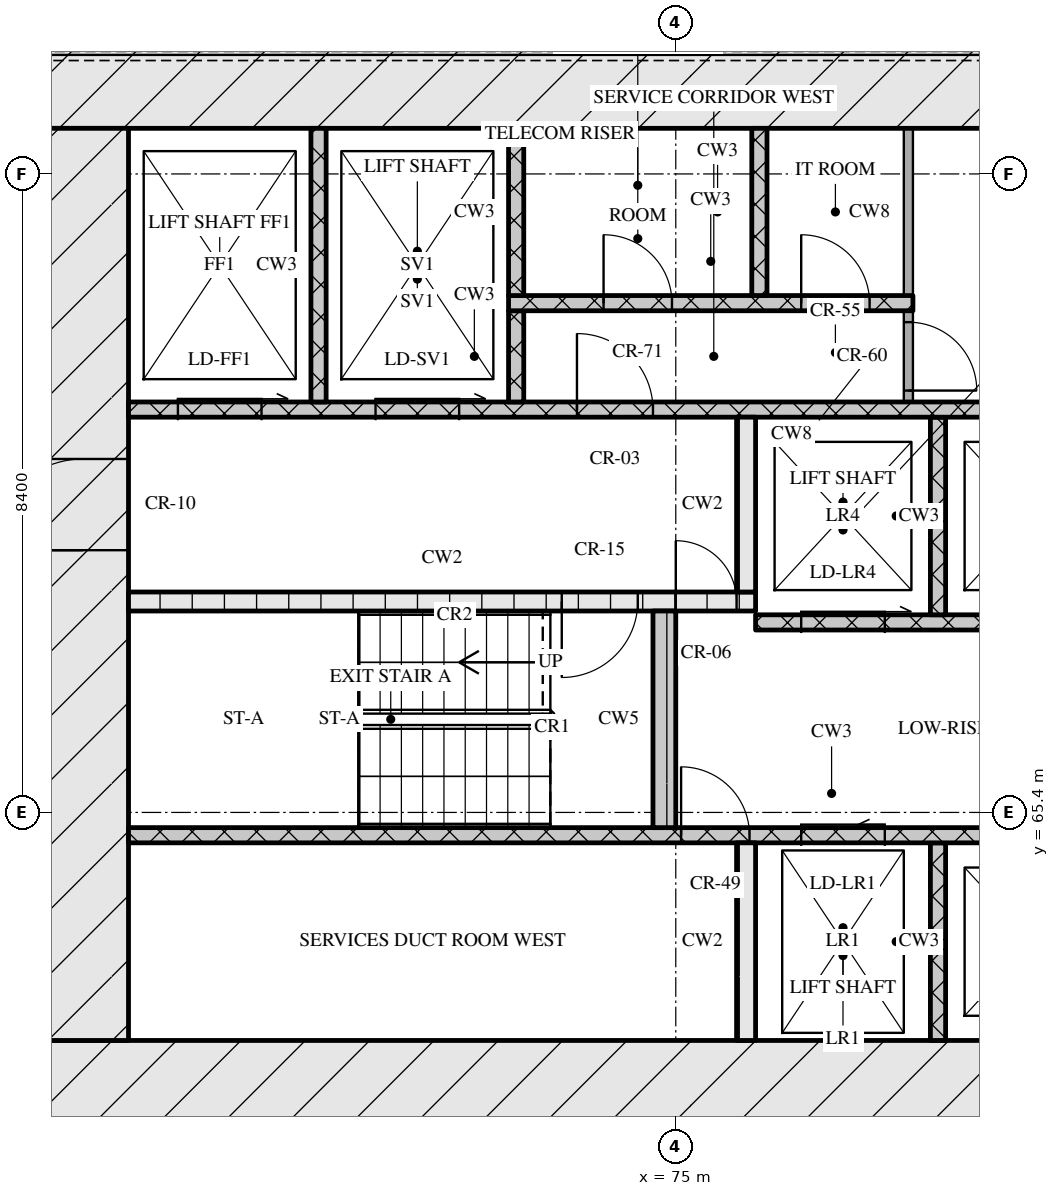
"""IFC4 building model, lengths in metres.
Left out: names, types, materials, properties, quantities, classifications, styles, units other than length and angle.
Written with IfcOpenShell. Run it as: python <this file> out.ifc"""

import sys

from ifc_helpers import new_model, si_unit, direction, frame, frame_2d, origin, place, context, subcontext, project, spatial, rectangle, extrude, element, fill, save


model = new_model("IFC4")
c1 = context("Model", 3, precision=1e-05, world=origin(), true_north=direction((0.0, 1.0)))
c2 = subcontext(c1, "Body", "Model", "MODEL_VIEW")
j1 = project(units=[si_unit("LENGTHUNIT", "METRE"), si_unit("PLANEANGLEUNIT", "RADIAN")], contexts=[c1])
p1 = place(None, origin())
s1 = spatial("IfcSite", under=j1, at=p1, CompositionType="ELEMENT")
p2 = place(p1, origin())
s2 = spatial("IfcBuilding", under=s1, at=p2, CompositionType="ELEMENT")
p3 = place(p2, frame((0.0, 0.0, 76.8)))
s3 = spatial("IfcBuildingStorey", under=s2, at=p3, CompositionType="ELEMENT", Elevation=76.8)
p4 = place(p3, frame((66.6, 61.8, 0.0), z_axis=(0.0, 0.0, 1.0), x_axis=(1.0, 0.0, 0.0)))
e1 = element("IfcWall", 1, at=p4, inside=s3, PredefinedType="SOLIDWALL", context=c2, shape_type="SweptSolid", body=[
    extrude(rectangle(XDim=42.0, YDim=1.2, at=frame_2d((21.0, 0.0))), origin(), (0.0, 0.0, 1.0), 3.32),
])
p5 = place(p4, frame((21.35, 0.0, 0.0)))
e2 = element("IfcOpeningElement", 2, at=p5, cuts=e1, PredefinedType="OPENING", context=c2, shape_type="SweptSolid", body=[
    extrude(rectangle(XDim=1.8, YDim=2.1, at=frame_2d((0.9, 1.05))), frame((0.0, 0.61, 0.0), z_axis=(0.0, -1.0, 0.0), x_axis=(1.0, 0.0, 0.0)), (0.0, 0.0, 1.0), 1.22),
])
p6 = place(p3, frame((66.6, 75.0, 0.0), z_axis=(0.0, 0.0, 1.0), x_axis=(1.0, 0.0, 0.0)))
e3 = element("IfcWall", 3, at=p6, inside=s3, PredefinedType="SOLIDWALL", context=c2, shape_type="SweptSolid", body=[
    extrude(rectangle(XDim=42.0, YDim=1.2, at=frame_2d((21.0, 0.0))), origin(), (0.0, 0.0, 1.0), 3.32),
])
p7 = place(p3, frame((67.2, 62.4, 0.0), z_axis=(0.0, 0.0, 1.0), x_axis=(0.0, 1.0, 0.0)))
e4 = element("IfcWall", 4, at=p7, inside=s3, PredefinedType="SOLIDWALL", context=c2, shape_type="SweptSolid", body=[
    extrude(rectangle(XDim=12.0, YDim=1.2, at=frame_2d((6.0, 0.0))), origin(), (0.0, 0.0, 1.0), 3.32),
])
p8 = place(p7, frame((6.45, 0.0, 0.0)))
e5 = element("IfcOpeningElement", 5, at=p8, cuts=e4, PredefinedType="OPENING", context=c2, shape_type="SweptSolid", body=[
    extrude(rectangle(XDim=1.2, YDim=2.1, at=frame_2d((0.6, 1.05))), frame((0.0, 0.61, 0.0), z_axis=(0.0, -1.0, 0.0), x_axis=(1.0, 0.0, 0.0)), (0.0, 0.0, 1.0), 1.22),
])
p9 = place(p3, frame((75.925, 62.4, 0.0), z_axis=(0.0, 0.0, 1.0), x_axis=(0.0, 1.0, 0.0)))
e6 = element("IfcWall", 6, at=p9, inside=s3, PredefinedType="SOLIDWALL", context=c2, shape_type="SweptSolid", body=[
    extrude(rectangle(XDim=2.6, YDim=0.25, at=frame_2d((1.3, 0.0))), origin(), (0.0, 0.0, 1.0), 3.32),
])
p10 = place(p3, frame((78.45, 62.4, 0.0), z_axis=(0.0, 0.0, 1.0), x_axis=(0.0, 1.0, 0.0)))
e7 = element("IfcWall", 7, at=p10, inside=s3, PredefinedType="SOLIDWALL", context=c2, shape_type="SweptSolid", body=[
    extrude(rectangle(XDim=2.6, YDim=0.2, at=frame_2d((1.3, 0.0))), origin(), (0.0, 0.0, 1.0), 3.32),
])
p11 = place(p3, frame((67.8, 65.1, 0.0), z_axis=(0.0, 0.0, 1.0), x_axis=(1.0, 0.0, 0.0)))
e8 = element("IfcWall", 8, at=p11, inside=s3, PredefinedType="SOLIDWALL", context=c2, shape_type="SweptSolid", body=[
    extrude(rectangle(XDim=18.5, YDim=0.2, at=frame_2d((9.25, 0.0))), origin(), (0.0, 0.0, 1.0), 3.32),
])
p12 = place(p11, frame((7.27, 0.0, 0.0)))
e9 = element("IfcOpeningElement", 9, at=p12, cuts=e8, PredefinedType="OPENING", context=c2, shape_type="SweptSolid", body=[
    extrude(rectangle(XDim=0.9, YDim=2.1, at=frame_2d((0.45, 1.05))), frame((0.0, 0.11, 0.0), z_axis=(0.0, -1.0, 0.0), x_axis=(1.0, 0.0, 0.0)), (0.0, 0.0, 1.0), 0.22),
])
p13 = place(p11, frame((8.85, 0.0, 0.0)))
e10 = element("IfcOpeningElement", 10, at=p13, cuts=e8, PredefinedType="OPENING", context=c2, shape_type="SweptSolid", body=[
    extrude(rectangle(XDim=1.1, YDim=2.1, at=frame_2d((0.55, 1.05))), frame((0.0, 0.11, 0.0), z_axis=(0.0, -1.0, 0.0), x_axis=(1.0, 0.0, 0.0)), (0.0, 0.0, 1.0), 0.22),
])
p14 = place(p11, frame((11.35, 0.0, 0.0)))
e11 = element("IfcOpeningElement", 11, at=p14, cuts=e8, PredefinedType="OPENING", context=c2, shape_type="SweptSolid", body=[
    extrude(rectangle(XDim=1.1, YDim=2.1, at=frame_2d((0.55, 1.05))), frame((0.0, 0.11, 0.0), z_axis=(0.0, -1.0, 0.0), x_axis=(1.0, 0.0, 0.0)), (0.0, 0.0, 1.0), 0.22),
])
p15 = place(p11, frame((13.85, 0.0, 0.0)))
e12 = element("IfcOpeningElement", 12, at=p15, cuts=e8, PredefinedType="OPENING", context=c2, shape_type="SweptSolid", body=[
    extrude(rectangle(XDim=1.1, YDim=2.1, at=frame_2d((0.55, 1.05))), frame((0.0, 0.11, 0.0), z_axis=(0.0, -1.0, 0.0), x_axis=(1.0, 0.0, 0.0)), (0.0, 0.0, 1.0), 0.22),
])
p16 = place(p11, frame((16.7, 0.0, 0.0)))
e13 = element("IfcOpeningElement", 13, at=p16, cuts=e8, PredefinedType="OPENING", context=c2, shape_type="SweptSolid", body=[
    extrude(rectangle(XDim=0.9, YDim=2.1, at=frame_2d((0.45, 1.05))), frame((0.0, 0.11, 0.0), z_axis=(0.0, -1.0, 0.0), x_axis=(1.0, 0.0, 0.0)), (0.0, 0.0, 1.0), 0.22),
])
p17 = place(p3, frame((74.85, 65.2, 0.0), z_axis=(0.0, 0.0, 1.0), x_axis=(0.0, 1.0, 0.0)))
e14 = element("IfcWall", 14, at=p17, inside=s3, PredefinedType="SOLIDWALL", context=c2, shape_type="SweptSolid", body=[
    extrude(rectangle(XDim=2.85, YDim=0.3, at=frame_2d((1.425, 0.0))), origin(), (0.0, 0.0, 1.0), 3.32),
])
p18 = place(p3, frame((76.05, 67.9, 0.0), z_axis=(0.0, 0.0, 1.0), x_axis=(1.0, 0.0, 0.0)))
e15 = element("IfcWall", 15, at=p18, inside=s3, PredefinedType="SOLIDWALL", context=c2, shape_type="SweptSolid", body=[
    extrude(rectangle(XDim=23.1, YDim=0.2, at=frame_2d((11.55, 0.0))), origin(), (0.0, 0.0, 1.0), 3.32),
])
p19 = place(p18, frame((0.6, 0.0, 0.0)))
e16 = element("IfcOpeningElement", 16, at=p19, cuts=e15, PredefinedType="OPENING", context=c2, shape_type="SweptSolid", body=[
    extrude(rectangle(XDim=1.1, YDim=2.1, at=frame_2d((0.55, 1.05))), frame((0.0, 0.11, 0.0), z_axis=(0.0, -1.0, 0.0), x_axis=(1.0, 0.0, 0.0)), (0.0, 0.0, 1.0), 0.22),
])
p20 = place(p18, frame((3.1, 0.0, 0.0)))
e17 = element("IfcOpeningElement", 17, at=p20, cuts=e15, PredefinedType="OPENING", context=c2, shape_type="SweptSolid", body=[
    extrude(rectangle(XDim=1.1, YDim=2.1, at=frame_2d((0.55, 1.05))), frame((0.0, 0.11, 0.0), z_axis=(0.0, -1.0, 0.0), x_axis=(1.0, 0.0, 0.0)), (0.0, 0.0, 1.0), 0.22),
])
p21 = place(p18, frame((5.6, 0.0, 0.0)))
e18 = element("IfcOpeningElement", 18, at=p21, cuts=e15, PredefinedType="OPENING", context=c2, shape_type="SweptSolid", body=[
    extrude(rectangle(XDim=1.1, YDim=2.1, at=frame_2d((0.55, 1.05))), frame((0.0, 0.11, 0.0), z_axis=(0.0, -1.0, 0.0), x_axis=(1.0, 0.0, 0.0)), (0.0, 0.0, 1.0), 0.22),
])
p22 = place(p18, frame((8.45, 0.0, 0.0)))
e19 = element("IfcOpeningElement", 19, at=p22, cuts=e15, PredefinedType="OPENING", context=c2, shape_type="SweptSolid", body=[
    extrude(rectangle(XDim=0.9, YDim=2.1, at=frame_2d((0.45, 1.05))), frame((0.0, 0.11, 0.0), z_axis=(0.0, -1.0, 0.0), x_axis=(1.0, 0.0, 0.0)), (0.0, 0.0, 1.0), 0.22),
])
p23 = place(p18, frame((10.91, 0.0, 0.0)))
e20 = element("IfcOpeningElement", 20, at=p23, cuts=e15, PredefinedType="OPENING", context=c2, shape_type="SweptSolid", body=[
    extrude(rectangle(XDim=0.9, YDim=2.1, at=frame_2d((0.45, 1.05))), frame((0.0, 0.11, 0.0), z_axis=(0.0, -1.0, 0.0), x_axis=(1.0, 0.0, 0.0)), (0.0, 0.0, 1.0), 0.22),
])
p24 = place(p18, frame((13.55, 0.0, 0.0)))
e21 = element("IfcOpeningElement", 21, at=p24, cuts=e15, PredefinedType="OPENING", context=c2, shape_type="SweptSolid", body=[
    extrude(rectangle(XDim=1.0, YDim=2.1, at=frame_2d((0.5, 1.05))), frame((0.0, 0.11, 0.0), z_axis=(0.0, -1.0, 0.0), x_axis=(1.0, 0.0, 0.0)), (0.0, 0.0, 1.0), 0.22),
])
p25 = place(p3, frame((78.45, 68.0, 0.0), z_axis=(0.0, 0.0, 1.0), x_axis=(0.0, 1.0, 0.0)))
e22 = element("IfcWall", 22, at=p25, inside=s3, PredefinedType="SOLIDWALL", context=c2, shape_type="SweptSolid", body=[
    extrude(rectangle(XDim=2.6, YDim=0.2, at=frame_2d((1.3, 0.0))), origin(), (0.0, 0.0, 1.0), 3.32),
])
p26 = place(p3, frame((67.8, 68.175, 0.0), z_axis=(0.0, 0.0, 1.0), x_axis=(1.0, 0.0, 0.0)))
e23 = element("IfcWall", 23, at=p26, inside=s3, PredefinedType="SOLIDWALL", context=c2, shape_type="SweptSolid", body=[
    extrude(rectangle(XDim=8.25, YDim=0.25, at=frame_2d((4.125, 0.0))), origin(), (0.0, 0.0, 1.0), 3.32),
])
p27 = place(p26, frame((5.7, 0.0, 0.0)))
e24 = element("IfcOpeningElement", 24, at=p27, cuts=e23, PredefinedType="OPENING", context=c2, shape_type="SweptSolid", body=[
    extrude(rectangle(XDim=1.0, YDim=2.1, at=frame_2d((0.5, 1.05))), frame((0.0, 0.135, 0.0), z_axis=(0.0, -1.0, 0.0), x_axis=(1.0, 0.0, 0.0)), (0.0, 0.0, 1.0), 0.27),
])
p28 = place(p26, frame((7.2, 0.0, 0.0)))
e25 = element("IfcOpeningElement", 25, at=p28, cuts=e23, PredefinedType="OPENING", context=c2, shape_type="SweptSolid", body=[
    extrude(rectangle(XDim=0.8, YDim=2.1, at=frame_2d((0.4, 1.05))), frame((0.0, 0.135, 0.0), z_axis=(0.0, -1.0, 0.0), x_axis=(1.0, 0.0, 0.0)), (0.0, 0.0, 1.0), 0.27),
])
p29 = place(p3, frame((75.925, 68.3, 0.0), z_axis=(0.0, 0.0, 1.0), x_axis=(0.0, 1.0, 0.0)))
e26 = element("IfcWall", 26, at=p29, inside=s3, PredefinedType="SOLIDWALL", context=c2, shape_type="SweptSolid", body=[
    extrude(rectangle(XDim=2.3, YDim=0.25, at=frame_2d((1.15, 0.0))), origin(), (0.0, 0.0, 1.0), 3.32),
])
p30 = place(p3, frame((67.8, 70.7, 0.0), z_axis=(0.0, 0.0, 1.0), x_axis=(1.0, 0.0, 0.0)))
e27 = element("IfcWall", 27, at=p30, inside=s3, PredefinedType="SOLIDWALL", context=c2, shape_type="SweptSolid", body=[
    extrude(rectangle(XDim=39.6, YDim=0.2, at=frame_2d((19.8, 0.0))), origin(), (0.0, 0.0, 1.0), 3.32),
])
p31 = place(p30, frame((0.65, 0.0, 0.0)))
e28 = element("IfcOpeningElement", 28, at=p31, cuts=e27, PredefinedType="OPENING", context=c2, shape_type="SweptSolid", body=[
    extrude(rectangle(XDim=1.1, YDim=2.1, at=frame_2d((0.55, 1.05))), frame((0.0, 0.11, 0.0), z_axis=(0.0, -1.0, 0.0), x_axis=(1.0, 0.0, 0.0)), (0.0, 0.0, 1.0), 0.22),
])
p32 = place(p30, frame((3.25, 0.0, 0.0)))
e29 = element("IfcOpeningElement", 29, at=p32, cuts=e27, PredefinedType="OPENING", context=c2, shape_type="SweptSolid", body=[
    extrude(rectangle(XDim=1.1, YDim=2.1, at=frame_2d((0.55, 1.05))), frame((0.0, 0.11, 0.0), z_axis=(0.0, -1.0, 0.0), x_axis=(1.0, 0.0, 0.0)), (0.0, 0.0, 1.0), 0.22),
])
p33 = place(p30, frame((5.9, 0.0, 0.0)))
e30 = element("IfcOpeningElement", 30, at=p33, cuts=e27, PredefinedType="OPENING", context=c2, shape_type="SweptSolid", body=[
    extrude(rectangle(XDim=1.0, YDim=2.1, at=frame_2d((0.5, 1.05))), frame((0.0, 0.11, 0.0), z_axis=(0.0, -1.0, 0.0), x_axis=(1.0, 0.0, 0.0)), (0.0, 0.0, 1.0), 0.22),
])
p34 = place(p30, frame((21.7, 0.0, 0.0)))
e31 = element("IfcOpeningElement", 31, at=p34, cuts=e27, PredefinedType="OPENING", context=c2, shape_type="SweptSolid", body=[
    extrude(rectangle(XDim=1.0, YDim=2.1, at=frame_2d((0.5, 1.05))), frame((0.0, 0.11, 0.0), z_axis=(0.0, -1.0, 0.0), x_axis=(1.0, 0.0, 0.0)), (0.0, 0.0, 1.0), 0.22),
])
p35 = place(p30, frame((32.7, 0.0, 0.0)))
e32 = element("IfcOpeningElement", 32, at=p35, cuts=e27, PredefinedType="OPENING", context=c2, shape_type="SweptSolid", body=[
    extrude(rectangle(XDim=1.0, YDim=2.1, at=frame_2d((0.5, 1.05))), frame((0.0, 0.11, 0.0), z_axis=(0.0, -1.0, 0.0), x_axis=(1.0, 0.0, 0.0)), (0.0, 0.0, 1.0), 0.22),
])
p36 = place(p30, frame((35.25, 0.0, 0.0)))
e33 = element("IfcOpeningElement", 33, at=p36, cuts=e27, PredefinedType="OPENING", context=c2, shape_type="SweptSolid", body=[
    extrude(rectangle(XDim=1.1, YDim=2.1, at=frame_2d((0.55, 1.05))), frame((0.0, 0.11, 0.0), z_axis=(0.0, -1.0, 0.0), x_axis=(1.0, 0.0, 0.0)), (0.0, 0.0, 1.0), 0.22),
])
p37 = place(p30, frame((37.85, 0.0, 0.0)))
e34 = element("IfcOpeningElement", 34, at=p37, cuts=e27, PredefinedType="OPENING", context=c2, shape_type="SweptSolid", body=[
    extrude(rectangle(XDim=1.1, YDim=2.1, at=frame_2d((0.55, 1.05))), frame((0.0, 0.11, 0.0), z_axis=(0.0, -1.0, 0.0), x_axis=(1.0, 0.0, 0.0)), (0.0, 0.0, 1.0), 0.22),
])
p38 = place(p3, frame((70.3, 70.8, 0.0), z_axis=(0.0, 0.0, 1.0), x_axis=(0.0, 1.0, 0.0)))
e35 = element("IfcWall", 35, at=p38, inside=s3, PredefinedType="SOLIDWALL", context=c2, shape_type="SweptSolid", body=[
    extrude(rectangle(XDim=3.6, YDim=0.2, at=frame_2d((1.8, 0.0))), origin(), (0.0, 0.0, 1.0), 3.32),
])
p39 = place(p3, frame((72.9, 70.8, 0.0), z_axis=(0.0, 0.0, 1.0), x_axis=(0.0, 1.0, 0.0)))
e36 = element("IfcWall", 36, at=p39, inside=s3, PredefinedType="SOLIDWALL", context=c2, shape_type="SweptSolid", body=[
    extrude(rectangle(XDim=1.2, YDim=0.2, at=frame_2d((0.6, 0.0))), origin(), (0.0, 0.0, 1.0), 3.32),
])
p40 = place(p3, frame((78.06, 70.8, 0.0), z_axis=(0.0, 0.0, 1.0), x_axis=(0.0, 1.0, 0.0)))
e37 = element("IfcWall", 37, at=p40, inside=s3, PredefinedType="PARTITIONING", context=c2, shape_type="SweptSolid", body=[
    extrude(rectangle(XDim=1.2, YDim=0.12, at=frame_2d((0.6, 0.0))), origin(), (0.0, 0.0, 1.0), 3.32),
])
p41 = place(p40, frame((0.15, 0.0, 0.0)))
e38 = element("IfcOpeningElement", 38, at=p41, cuts=e37, PredefinedType="OPENING", context=c2, shape_type="SweptSolid", body=[
    extrude(rectangle(XDim=0.9, YDim=2.1, at=frame_2d((0.45, 1.05))), frame((0.0, 0.07, 0.0), z_axis=(0.0, -1.0, 0.0), x_axis=(1.0, 0.0, 0.0)), (0.0, 0.0, 1.0), 0.14),
])
p42 = place(p3, frame((72.8, 72.1, 0.0), z_axis=(0.0, 0.0, 1.0), x_axis=(1.0, 0.0, 0.0)))
e39 = element("IfcWall", 39, at=p42, inside=s3, PredefinedType="SOLIDWALL", context=c2, shape_type="SweptSolid", body=[
    extrude(rectangle(XDim=5.32, YDim=0.2, at=frame_2d((2.66, 0.0))), origin(), (0.0, 0.0, 1.0), 3.32),
])
p43 = place(p42, frame((1.25, 0.0, 0.0)))
e40 = element("IfcOpeningElement", 40, at=p43, cuts=e39, PredefinedType="OPENING", context=c2, shape_type="SweptSolid", body=[
    extrude(rectangle(XDim=0.9, YDim=2.1, at=frame_2d((0.45, 1.05))), frame((0.0, 0.11, 0.0), z_axis=(0.0, -1.0, 0.0), x_axis=(1.0, 0.0, 0.0)), (0.0, 0.0, 1.0), 0.22),
])
p44 = place(p42, frame((3.85, 0.0, 0.0)))
e41 = element("IfcOpeningElement", 41, at=p44, cuts=e39, PredefinedType="OPENING", context=c2, shape_type="SweptSolid", body=[
    extrude(rectangle(XDim=0.9, YDim=2.1, at=frame_2d((0.45, 1.05))), frame((0.0, 0.11, 0.0), z_axis=(0.0, -1.0, 0.0), x_axis=(1.0, 0.0, 0.0)), (0.0, 0.0, 1.0), 0.22),
])
for number, where, z_axis, x_axis in (
    (42, (72.9, 72.2, 0.0), (0.0, 0.0, 1.0), (0.0, 1.0, 0.0)),
    (43, (76.1, 72.2, 0.0), (0.0, 0.0, 1.0), (0.0, 1.0, 0.0)),
):
    element("IfcWall", number, at=place(p3, frame(where, z_axis=z_axis, x_axis=x_axis)), inside=s3, PredefinedType="SOLIDWALL", context=c2, shape_type="SweptSolid", body=[
        extrude(rectangle(XDim=2.2, YDim=0.2, at=frame_2d((1.1, 0.0))), origin(), (0.0, 0.0, 1.0), 3.32),
    ])
p45 = place(p3, frame((78.06, 72.2, 0.0), z_axis=(0.0, 0.0, 1.0), x_axis=(0.0, 1.0, 0.0)))
e44 = element("IfcWall", 44, at=p45, inside=s3, PredefinedType="PARTITIONING", context=c2, shape_type="SweptSolid", body=[
    extrude(rectangle(XDim=2.2, YDim=0.12, at=frame_2d((1.1, 0.0))), origin(), (0.0, 0.0, 1.0), 3.32),
])
p46 = place(p12, origin())
e45 = element("IfcDoor", 45, at=p46, inside=s3, OperationType="SINGLE_SWING_LEFT", PredefinedType="DOOR", context=c2, shape_type="SweptSolid", body=[
    extrude(rectangle(XDim=0.9, YDim=2.1, at=frame_2d((0.45, 1.05))), frame((0.0, 0.025, 0.0), z_axis=(0.0, -1.0, 0.0), x_axis=(1.0, 0.0, 0.0)), (0.0, 0.0, 1.0), 0.05),
])
fill(e9, e45)
p47 = place(p13, origin())
e46 = element("IfcDoor", 46, at=p47, inside=s3, OperationType="SLIDING_TO_LEFT", PredefinedType="DOOR", context=c2, shape_type="SweptSolid", body=[
    extrude(rectangle(XDim=1.1, YDim=2.1, at=frame_2d((0.55, 1.05))), frame((0.0, 0.025, 0.0), z_axis=(0.0, -1.0, 0.0), x_axis=(1.0, 0.0, 0.0)), (0.0, 0.0, 1.0), 0.05),
])
fill(e10, e46)
p48 = place(p19, origin())
e47 = element("IfcDoor", 47, at=p48, inside=s3, OperationType="SLIDING_TO_RIGHT", PredefinedType="DOOR", context=c2, shape_type="SweptSolid", body=[
    extrude(rectangle(XDim=1.1, YDim=2.1, at=frame_2d((0.55, 1.05))), frame((0.0, 0.025, 0.0), z_axis=(0.0, -1.0, 0.0), x_axis=(1.0, 0.0, 0.0)), (0.0, 0.0, 1.0), 0.05),
])
fill(e16, e47)
p49 = place(p27, origin())
e48 = element("IfcDoor", 48, at=p49, inside=s3, OperationType="SINGLE_SWING_RIGHT", PredefinedType="DOOR", context=c2, shape_type="SweptSolid", body=[
    extrude(rectangle(XDim=1.0, YDim=2.1, at=frame_2d((0.5, 1.05))), frame((0.0, 0.025, 0.0), z_axis=(0.0, -1.0, 0.0), x_axis=(1.0, 0.0, 0.0)), (0.0, 0.0, 1.0), 0.05),
])
fill(e24, e48)
p50 = place(p28, origin())
e49 = element("IfcDoor", 49, at=p50, inside=s3, OperationType="SINGLE_SWING_LEFT", PredefinedType="DOOR", context=c2, shape_type="SweptSolid", body=[
    extrude(rectangle(XDim=0.8, YDim=2.1, at=frame_2d((0.4, 1.05))), frame((0.0, 0.025, 0.0), z_axis=(0.0, -1.0, 0.0), x_axis=(1.0, 0.0, 0.0)), (0.0, 0.0, 1.0), 0.05),
])
fill(e25, e49)
p51 = place(p8, origin())
e50 = element("IfcDoor", 50, at=p51, inside=s3, OperationType="SINGLE_SWING_LEFT", PredefinedType="DOOR", context=c2, shape_type="SweptSolid", body=[
    extrude(rectangle(XDim=1.2, YDim=2.1, at=frame_2d((0.6, 1.05))), frame((0.0, 0.025, 0.0), z_axis=(0.0, -1.0, 0.0), x_axis=(1.0, 0.0, 0.0)), (0.0, 0.0, 1.0), 0.05),
])
fill(e5, e50)
p52 = place(p31, origin())
e51 = element("IfcDoor", 51, at=p52, inside=s3, OperationType="SLIDING_TO_RIGHT", PredefinedType="DOOR", context=c2, shape_type="SweptSolid", body=[
    extrude(rectangle(XDim=1.1, YDim=2.1, at=frame_2d((0.55, 1.05))), frame((0.0, 0.025, 0.0), z_axis=(0.0, -1.0, 0.0), x_axis=(1.0, 0.0, 0.0)), (0.0, 0.0, 1.0), 0.05),
])
fill(e28, e51)
p53 = place(p32, origin())
e52 = element("IfcDoor", 52, at=p53, inside=s3, OperationType="SLIDING_TO_RIGHT", PredefinedType="DOOR", context=c2, shape_type="SweptSolid", body=[
    extrude(rectangle(XDim=1.1, YDim=2.1, at=frame_2d((0.55, 1.05))), frame((0.0, 0.025, 0.0), z_axis=(0.0, -1.0, 0.0), x_axis=(1.0, 0.0, 0.0)), (0.0, 0.0, 1.0), 0.05),
])
fill(e29, e52)
p54 = place(p33, origin())
e53 = element("IfcDoor", 53, at=p54, inside=s3, OperationType="SINGLE_SWING_LEFT", PredefinedType="DOOR", context=c2, shape_type="SweptSolid", body=[
    extrude(rectangle(XDim=1.0, YDim=2.1, at=frame_2d((0.5, 1.05))), frame((0.0, 0.025, 0.0), z_axis=(0.0, -1.0, 0.0), x_axis=(1.0, 0.0, 0.0)), (0.0, 0.0, 1.0), 0.05),
])
fill(e30, e53)
p55 = place(p41, origin())
e54 = element("IfcDoor", 54, at=p55, inside=s3, OperationType="SINGLE_SWING_RIGHT", PredefinedType="DOOR", context=c2, shape_type="SweptSolid", body=[
    extrude(rectangle(XDim=0.9, YDim=2.1, at=frame_2d((0.45, 1.05))), frame((0.0, 0.025, 0.0), z_axis=(0.0, -1.0, 0.0), x_axis=(1.0, 0.0, 0.0)), (0.0, 0.0, 1.0), 0.05),
])
fill(e38, e54)
p56 = place(p43, origin())
e55 = element("IfcDoor", 55, at=p56, inside=s3, OperationType="SINGLE_SWING_LEFT", PredefinedType="DOOR", context=c2, shape_type="SweptSolid", body=[
    extrude(rectangle(XDim=0.9, YDim=2.1, at=frame_2d((0.45, 1.05))), frame((0.0, 0.025, 0.0), z_axis=(0.0, -1.0, 0.0), x_axis=(1.0, 0.0, 0.0)), (0.0, 0.0, 1.0), 0.05),
])
fill(e40, e55)
p57 = place(p44, origin())
e56 = element("IfcDoor", 56, at=p57, inside=s3, OperationType="SINGLE_SWING_LEFT", PredefinedType="DOOR", context=c2, shape_type="SweptSolid", body=[
    extrude(rectangle(XDim=0.9, YDim=2.1, at=frame_2d((0.45, 1.05))), frame((0.0, 0.025, 0.0), z_axis=(0.0, -1.0, 0.0), x_axis=(1.0, 0.0, 0.0)), (0.0, 0.0, 1.0), 0.05),
])
fill(e41, e56)
save(model, sys.argv[1])
